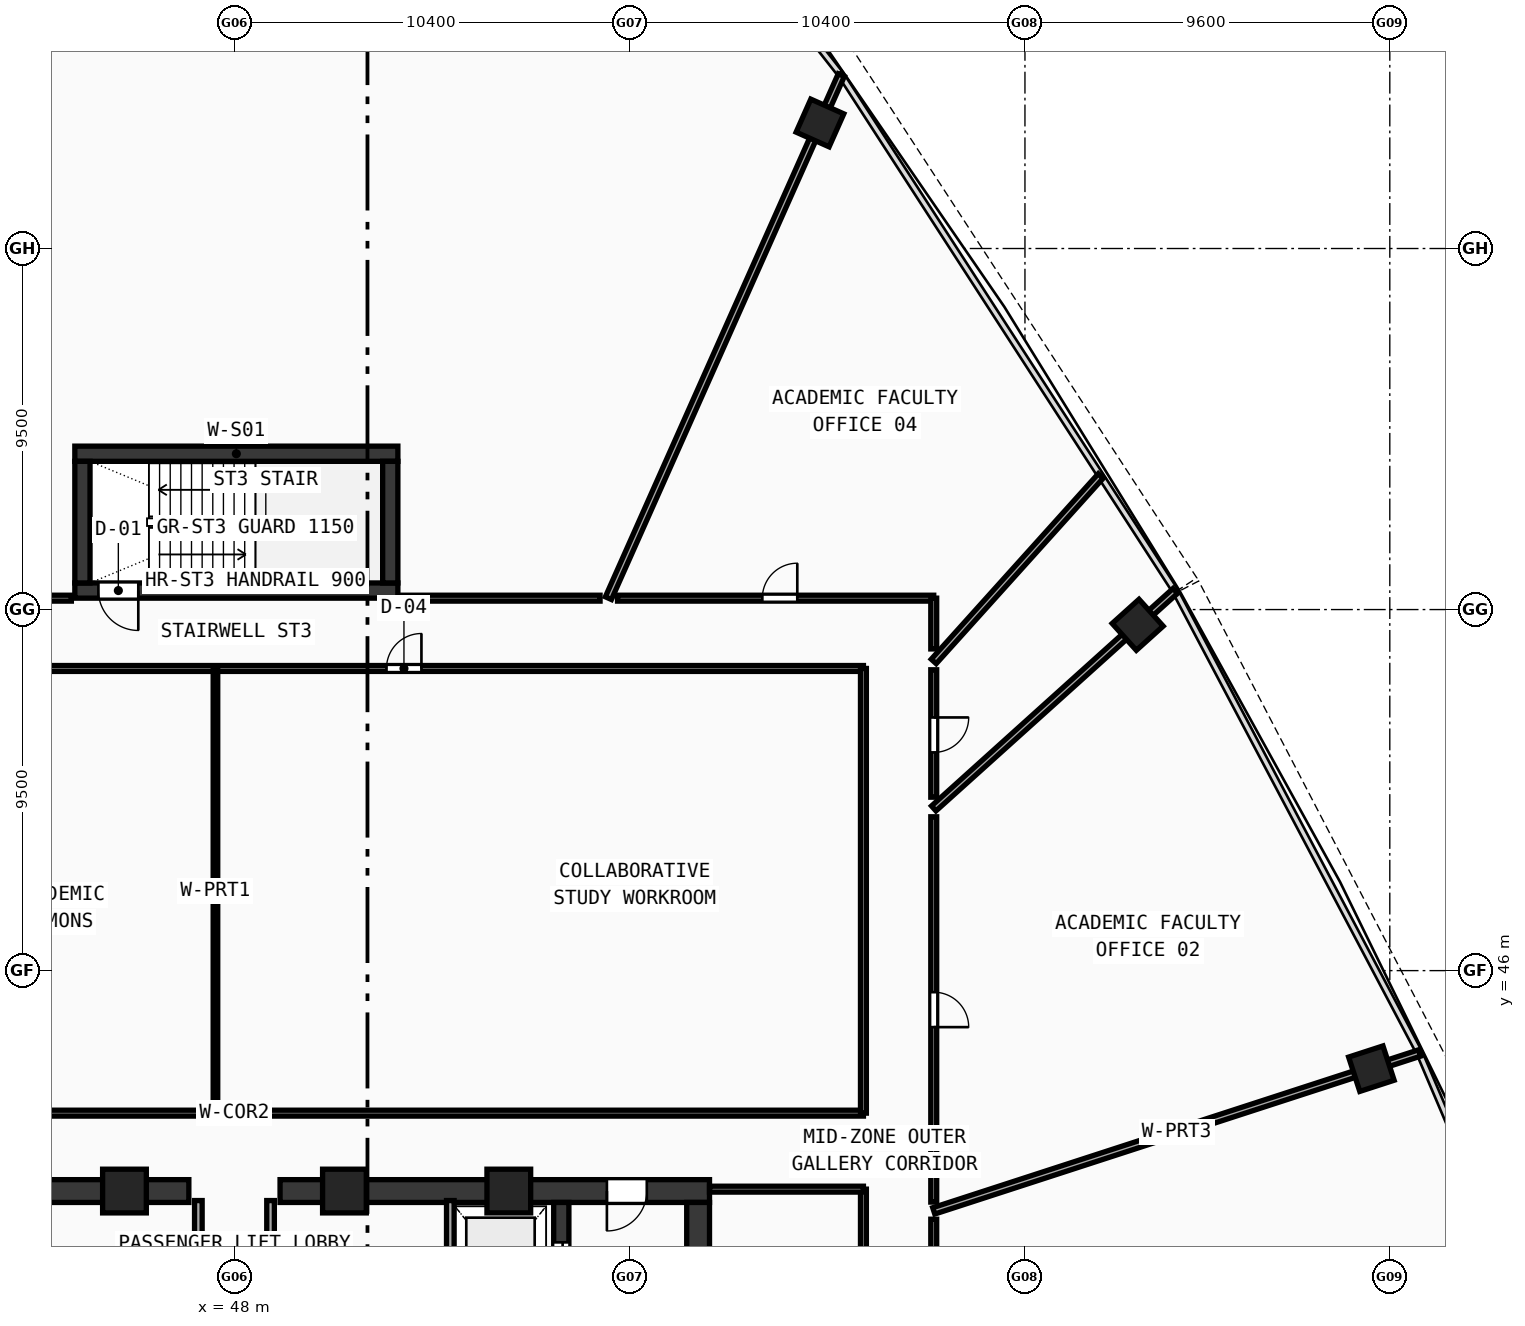
"""IFC4 building model, lengths in metres.
Left out: names, types, materials, properties, quantities, classifications, styles, units other than length and angle.
Written with IfcOpenShell. Run it as: python <this file> out.ifc"""

import sys

from ifc_helpers import new_model, si_unit, direction, frame, frame_2d, origin, origin_with_axes, origin_2d, place, context, subcontext, project, spatial, rectangle, hollow_rectangle, extrude, source, transform, mapped, element, fill, save


model = new_model("IFC4")
c1 = context("Model", 3, precision=1e-05, world=origin(), true_north=direction((0.0, 1.0)))
c2 = subcontext(c1, "Body", "Model", "MODEL_VIEW")
j1 = project(units=[si_unit("LENGTHUNIT", "METRE"), si_unit("PLANEANGLEUNIT", "RADIAN")], contexts=[c1])
p1 = place(None, origin())
s1 = spatial("IfcSite", under=j1, at=p1, CompositionType="ELEMENT")
p2 = place(p1, origin())
s2 = spatial("IfcBuilding", under=s1, at=p2, CompositionType="ELEMENT")
p3 = place(p2, frame((0.0, 0.0, 155.59)))
s3 = spatial("IfcBuildingStorey", under=s2, at=p3, CompositionType="ELEMENT", Elevation=155.59)
p4 = place(p3, frame((35.5, 40.2, 0.0), z_axis=(0.0, 0.0, 1.0), x_axis=(1.0, 0.0, 0.0)))
e1 = element("IfcWall", 1, at=p4, inside=s3, PredefinedType="SHEAR", context=c2, shape_type="SweptSolid", body=[
    extrude(rectangle(XDim=11.3, YDim=0.6, at=frame_2d((5.65, 0.0))), origin(), (0.0, 0.0, 1.0), 3.42),
])
p5 = place(p4, frame((1.65, 0.0, 0.0)))
e2 = element("IfcOpeningElement", 2, at=p5, cuts=e1, PredefinedType="OPENING", context=c2, shape_type="SweptSolid", body=[
    extrude(rectangle(XDim=1.05, YDim=2.1, at=frame_2d((0.525, 1.05))), frame((0.0, 0.31, 0.0), z_axis=(0.0, -1.0, 0.0), x_axis=(1.0, 0.0, 0.0)), (0.0, 0.0, 1.0), 0.62),
])
p6 = place(p3, frame((49.2, 40.2, 0.0), z_axis=(0.0, 0.0, 1.0), x_axis=(1.0, 0.0, 0.0)))
e3 = element("IfcWall", 3, at=p6, inside=s3, PredefinedType="SHEAR", context=c2, shape_type="SweptSolid", body=[
    extrude(rectangle(XDim=11.3, YDim=0.6, at=frame_2d((5.65, 0.0))), origin(), (0.0, 0.0, 1.0), 3.42),
])
p7 = place(p6, frame((8.6, 0.0, 0.0)))
e4 = element("IfcOpeningElement", 4, at=p7, cuts=e3, PredefinedType="OPENING", context=c2, shape_type="SweptSolid", body=[
    extrude(rectangle(XDim=1.05, YDim=2.1, at=frame_2d((0.525, 1.05))), frame((0.0, 0.31, 0.0), z_axis=(0.0, -1.0, 0.0), x_axis=(1.0, 0.0, 0.0)), (0.0, 0.0, 1.0), 0.62),
])
p8 = place(p3, frame((60.2, 27.8, 0.0), z_axis=(0.0, 0.0, 1.0), x_axis=(0.0, 1.0, 0.0)))
e5 = element("IfcWall", 5, at=p8, inside=s3, PredefinedType="SHEAR", context=c2, shape_type="SweptSolid", body=[
    extrude(rectangle(XDim=12.1, YDim=0.6, at=frame_2d((6.05, 0.0))), origin(), (0.0, 0.0, 1.0), 3.42),
])
p9 = place(p3, frame((56.6, 27.8, 0.0), z_axis=(0.0, 0.0, 1.0), x_axis=(0.0, 1.0, 0.0)))
e6 = element("IfcWall", 6, at=p9, inside=s3, PredefinedType="SHEAR", context=c2, shape_type="SweptSolid", body=[
    extrude(rectangle(XDim=12.1, YDim=0.4, at=frame_2d((6.05, 0.0))), origin(), (0.0, 0.0, 1.0), 3.42),
])
p10 = place(p9, frame((9.95, 0.0, 0.0)))
e7 = element("IfcOpeningElement", 7, at=p10, cuts=e6, PredefinedType="OPENING", context=c2, shape_type="SweptSolid", body=[
    extrude(rectangle(XDim=1.1, YDim=2.1, at=frame_2d((0.55, 1.05))), frame((0.0, 0.21, 0.0), z_axis=(0.0, -1.0, 0.0), x_axis=(1.0, 0.0, 0.0)), (0.0, 0.0, 1.0), 0.42),
])
p11 = place(p3, frame((43.8, 59.6, 0.0), z_axis=(0.0, 0.0, 1.0), x_axis=(1.0, 0.0, 0.0)))
e8 = element("IfcWall", 8, at=p11, inside=s3, PredefinedType="SHEAR", context=c2, shape_type="SweptSolid", body=[
    extrude(rectangle(XDim=8.5, YDim=0.4, at=frame_2d((4.25, 0.0))), origin(), (0.0, 0.0, 1.0), 3.42),
])
p12 = place(p3, frame((43.8, 56.0, 0.0), z_axis=(0.0, 0.0, 1.0), x_axis=(1.0, 0.0, 0.0)))
e9 = element("IfcWall", 9, at=p12, inside=s3, PredefinedType="SHEAR", context=c2, shape_type="SweptSolid", body=[
    extrude(rectangle(XDim=8.5, YDim=0.4, at=frame_2d((4.25, 0.0))), origin(), (0.0, 0.0, 1.0), 3.42),
])
p13 = place(p12, frame((0.62, 0.0, 0.0)))
e10 = element("IfcOpeningElement", 10, at=p13, cuts=e9, PredefinedType="OPENING", context=c2, shape_type="SweptSolid", body=[
    extrude(rectangle(XDim=1.05, YDim=2.1, at=frame_2d((0.525, 1.05))), frame((0.0, 0.21, 0.0), z_axis=(0.0, -1.0, 0.0), x_axis=(1.0, 0.0, 0.0)), (0.0, 0.0, 1.0), 0.42),
])
for number, where, z_axis, x_axis in (
    (11, (44.0, 56.2, 0.0), (0.0, 0.0, 1.0), (0.0, 1.0, 0.0)),
    (12, (52.1, 56.2, 0.0), (0.0, 0.0, 1.0), (0.0, 1.0, 0.0)),
):
    element("IfcWall", number, at=place(p3, frame(where, z_axis=z_axis, x_axis=x_axis)), inside=s3, PredefinedType="SHEAR", context=c2, shape_type="SweptSolid", body=[
        extrude(rectangle(XDim=3.2, YDim=0.4, at=frame_2d((1.6, 0.0))), origin(), (0.0, 0.0, 1.0), 3.42),
    ])
m1 = source(origin(), c2, "Body", "SweptSolid", [
    extrude(hollow_rectangle(XDim=1.15, YDim=1.15, WallThickness=0.048, at=origin_2d()), origin(), (0.0, 0.0, 1.0), 3.68),
])
for number, where, z_axis, x_axis in (
    (13, (55.219, 40.2, -0.26), (0.0, 0.0, 1.0), (1.0, 0.0, 0.0)),
    (14, (50.894, 40.2, -0.26), (0.0, 0.0, 1.0), (1.0, 0.0, 0.0)),
    (15, (45.106, 40.2, -0.26), (0.0, 0.0, 1.0), (1.0, 0.0, 0.0)),
):
    element("IfcColumn", number, at=place(p3, frame(where, z_axis=z_axis, x_axis=x_axis)), inside=s3, PredefinedType="COLUMN", context=c2, shape_type="MappedRepresentation", body=[
        mapped(m1, transform((0.0, 0.0, 0.0), scale=1.0)),
    ])
m2 = source(origin(), c2, "Body", "SweptSolid", [
    extrude(hollow_rectangle(XDim=0.95, YDim=0.95, WallThickness=0.04, at=origin_2d()), origin(), (0.0, 0.0, 1.0), 3.68),
])
for number, where, z_axis, x_axis in (
    (16, (77.915, 43.42, -0.26), (0.0, 0.0, 1.0), (-0.309, 0.951, 0.0)),
    (17, (71.766, 55.099, -0.26), (0.0, 0.0, 1.0), (-0.669, 0.743, 0.0)),
    (18, (63.406, 68.303, -0.26), (0.0, 0.0, 1.0), (-0.914, 0.407, 0.0)),
):
    element("IfcColumn", number, at=place(p3, frame(where, z_axis=z_axis, x_axis=x_axis)), inside=s3, PredefinedType="COLUMN", context=c2, shape_type="MappedRepresentation", body=[
        mapped(m2, transform((0.0, 0.0, 0.0), scale=1.0)),
    ])
p14 = place(p3, frame((53.68, 36.65, 0.0), z_axis=(0.0, 0.0, 1.0), x_axis=(0.0, 1.0, 0.0)))
e19 = element("IfcWall", 19, at=p14, inside=s3, PredefinedType="SOLIDWALL", context=c2, shape_type="SweptSolid", body=[
    extrude(rectangle(XDim=3.3, YDim=0.2, at=frame_2d((1.65, 0.0))), origin(), (0.0, 0.0, 1.0), 3.42),
])
for number, where, z_axis, x_axis in (
    (20, (47.05, 35.85, 0.0), (0.0, 0.0, 1.0), (0.0, 1.0, 0.0)),
    (21, (48.95, 35.85, 0.0), (0.0, 0.0, 1.0), (0.0, 1.0, 0.0)),
):
    element("IfcWall", number, at=place(p3, frame(where, z_axis=z_axis, x_axis=x_axis)), inside=s3, PredefinedType="SOLIDWALL", context=c2, shape_type="SweptSolid", body=[
        extrude(rectangle(XDim=4.1, YDim=0.2, at=frame_2d((2.05, 0.0))), origin(), (0.0, 0.0, 1.0), 3.42),
    ])
p15 = place(p3, frame((31.45, 42.25, 0.0), z_axis=(0.0, 0.0, 1.0), x_axis=(1.0, 0.0, 0.0)))
e22 = element("IfcWall", 22, at=p15, inside=s3, PredefinedType="PARTITIONING", context=c2, shape_type="SweptSolid", body=[
    extrude(rectangle(XDim=33.1, YDim=0.155, at=frame_2d((16.55, 0.0))), origin(), (0.0, 0.0, 1.0), 2.77),
])
p16 = place(p3, frame((31.45, 53.95, 0.0), z_axis=(0.0, 0.0, 1.0), x_axis=(1.0, 0.0, 0.0)))
e23 = element("IfcWall", 23, at=p16, inside=s3, PredefinedType="PARTITIONING", context=c2, shape_type="SweptSolid", body=[
    extrude(rectangle(XDim=33.1, YDim=0.155, at=frame_2d((16.55, 0.0))), origin(), (0.0, 0.0, 1.0), 2.77),
])
p17 = place(p16, frame((8.0, 0.0, 0.0)))
e24 = element("IfcOpeningElement", 24, at=p17, cuts=e23, PredefinedType="OPENING", context=c2, shape_type="SweptSolid", body=[
    extrude(rectangle(XDim=0.92, YDim=2.1, at=frame_2d((0.46, 1.05))), frame((0.0, 0.087, 0.0), z_axis=(0.0, -1.0, 0.0), x_axis=(1.0, 0.0, 0.0)), (0.0, 0.0, 1.0), 0.175),
])
p18 = place(p16, frame((20.55, 0.0, 0.0)))
e25 = element("IfcOpeningElement", 25, at=p18, cuts=e23, PredefinedType="OPENING", context=c2, shape_type="SweptSolid", body=[
    extrude(rectangle(XDim=0.92, YDim=2.1, at=frame_2d((0.46, 1.05))), frame((0.0, 0.087, 0.0), z_axis=(0.0, -1.0, 0.0), x_axis=(1.0, 0.0, 0.0)), (0.0, 0.0, 1.0), 0.175),
])
p19 = place(p3, frame((64.55, 42.25, 0.0), z_axis=(0.0, 0.0, 1.0), x_axis=(0.0, 1.0, 0.0)))
e26 = element("IfcWall", 26, at=p19, inside=s3, PredefinedType="PARTITIONING", context=c2, shape_type="SweptSolid", body=[
    extrude(rectangle(XDim=11.7, YDim=0.155, at=frame_2d((5.85, 0.0))), origin(), (0.0, 0.0, 1.0), 2.77),
])
p20 = place(p3, frame((47.5, 42.25, 0.0), z_axis=(0.0, 0.0, 1.0), x_axis=(0.0, 1.0, 0.0)))
e27 = element("IfcWall", 27, at=p20, inside=s3, PredefinedType="PARTITIONING", context=c2, shape_type="SweptSolid", body=[
    extrude(rectangle(XDim=11.7, YDim=0.12, at=frame_2d((5.85, 0.0))), origin(), (0.0, 0.0, 1.0), 3.02),
])
p21 = place(p3, frame((64.55, 23.65, 0.0), z_axis=(0.0, 0.0, 1.0), x_axis=(0.0, 1.0, 0.0)))
e28 = element("IfcWall", 28, at=p21, inside=s3, PredefinedType="PARTITIONING", context=c2, shape_type="SweptSolid", body=[
    extrude(rectangle(XDim=16.6, YDim=0.155, at=frame_2d((8.3, 0.0))), origin(), (0.0, 0.0, 1.0), 2.77),
])
p22 = place(p21, frame((7.5, 0.0, 0.0)))
e29 = element("IfcOpeningElement", 29, at=p22, cuts=e28, PredefinedType="OPENING", context=c2, shape_type="SweptSolid", body=[
    extrude(rectangle(XDim=0.9, YDim=2.08, at=frame_2d((0.45, 1.04))), frame((0.0, 0.087, 0.0), z_axis=(0.0, -1.0, 0.0), x_axis=(1.0, 0.0, 0.0)), (0.0, 0.0, 1.0), 0.175),
])
p23 = place(p3, frame((60.5, 40.25, 0.0), z_axis=(0.0, 0.0, 1.0), x_axis=(1.0, 0.0, 0.0)))
e30 = element("IfcWall", 30, at=p23, inside=s3, PredefinedType="PARTITIONING", context=c2, shape_type="SweptSolid", body=[
    extrude(rectangle(XDim=4.05, YDim=0.155, at=frame_2d((2.025, 0.0))), origin(), (0.0, 0.0, 1.0), 3.42),
])
p24 = place(p3, frame((66.4, 39.678, 0.0), z_axis=(0.0, 0.0, 1.0), x_axis=(0.951059027278, 0.309009266259, 0.0)))
e31 = element("IfcWall", 31, at=p24, inside=s3, PredefinedType="PARTITIONING", context=c2, shape_type="SweptSolid", body=[
    extrude(rectangle(XDim=13.441, YDim=0.175, at=frame_2d((6.72, 0.0))), origin(), (0.0, 0.0, 1.0), 2.77),
])
p25 = place(p3, frame((66.4, 50.267, 0.0), z_axis=(0.0, 0.0, 1.0), x_axis=(0.743147926867, 0.669127161901, 0.0)))
e32 = element("IfcWall", 32, at=p25, inside=s3, PredefinedType="PARTITIONING", context=c2, shape_type="SweptSolid", body=[
    extrude(rectangle(XDim=8.552, YDim=0.175, at=frame_2d((4.276, 0.0))), origin(), (0.0, 0.0, 1.0), 2.77),
])
p26 = place(p3, frame((66.4, 54.135, 0.0), z_axis=(0.0, 0.0, 1.0), x_axis=(0.669139250318, 0.74313704233, 0.0)))
e33 = element("IfcWall", 33, at=p26, inside=s3, PredefinedType="PARTITIONING", context=c2, shape_type="SweptSolid", body=[
    extrude(rectangle(XDim=6.569, YDim=0.175, at=frame_2d((3.284, 0.0))), origin(), (0.0, 0.0, 1.0), 2.77),
])
p27 = place(p3, frame((57.84, 55.8, 0.0), z_axis=(0.0, 0.0, 1.0), x_axis=(0.406736829456, 0.913545374661, 0.0)))
e34 = element("IfcWall", 34, at=p27, inside=s3, PredefinedType="PARTITIONING", context=c2, shape_type="SweptSolid", body=[
    extrude(rectangle(XDim=15.065, YDim=0.175, at=frame_2d((7.532, 0.0))), origin(), (0.0, 0.0, 1.0), 2.77),
])
p28 = place(p3, frame((29.6, 55.8, 0.0), z_axis=(0.0, 0.0, 1.0), x_axis=(1.0, 0.0, 0.0)))
e35 = element("IfcWall", 35, at=p28, inside=s3, PredefinedType="PARTITIONING", context=c2, shape_type="SweptSolid", body=[
    extrude(rectangle(XDim=14.109, YDim=0.155, at=frame_2d((7.054, 0.0))), origin(), (0.0, 0.0, 1.0), 2.77),
])
p29 = place(p28, frame((6.385, 0.0, 0.0)))
e36 = element("IfcOpeningElement", 36, at=p29, cuts=e35, PredefinedType="OPENING", context=c2, shape_type="SweptSolid", body=[
    extrude(rectangle(XDim=0.96, YDim=2.12, at=frame_2d((0.48, 1.06))), frame((0.0, 0.087, 0.0), z_axis=(0.0, -1.0, 0.0), x_axis=(1.0, 0.0, 0.0)), (0.0, 0.0, 1.0), 0.175),
])
p30 = place(p3, frame((52.391, 55.8, 0.0), z_axis=(0.0, 0.0, 1.0), x_axis=(1.0, 0.0, 0.0)))
e37 = element("IfcWall", 37, at=p30, inside=s3, PredefinedType="PARTITIONING", context=c2, shape_type="SweptSolid", body=[
    extrude(rectangle(XDim=5.229, YDim=0.155, at=frame_2d((2.614, 0.0))), origin(), (0.0, 0.0, 1.0), 2.77),
])
p31 = place(p3, frame((58.08, 55.8, 0.0), z_axis=(0.0, 0.0, 1.0), x_axis=(1.0, 0.0, 0.0)))
e38 = element("IfcWall", 38, at=p31, inside=s3, PredefinedType="PARTITIONING", context=c2, shape_type="SweptSolid", body=[
    extrude(rectangle(XDim=8.32, YDim=0.155, at=frame_2d((4.16, 0.0))), origin(), (0.0, 0.0, 1.0), 3.02),
])
p32 = place(p31, frame((3.809, 0.0, 0.0)))
e39 = element("IfcOpeningElement", 39, at=p32, cuts=e38, PredefinedType="OPENING", context=c2, shape_type="SweptSolid", body=[
    extrude(rectangle(XDim=0.92, YDim=2.1, at=frame_2d((0.46, 1.05))), frame((0.0, 0.087, 0.0), z_axis=(0.0, -1.0, 0.0), x_axis=(1.0, 0.0, 0.0)), (0.0, 0.0, 1.0), 0.175),
])
p33 = place(p3, frame((66.4, 55.8, 0.0), z_axis=(0.0, 0.0, 1.0), x_axis=(0.0, -1.0, 0.0)))
e40 = element("IfcWall", 40, at=p33, inside=s3, PredefinedType="PARTITIONING", context=c2, shape_type="SweptSolid", body=[
    extrude(rectangle(XDim=1.336, YDim=0.155, at=frame_2d((0.668, 0.0))), origin(), (0.0, 0.0, 1.0), 3.42),
])
p34 = place(p3, frame((66.4, 53.916, 0.0), z_axis=(0.0, 0.0, 1.0), x_axis=(0.0, -1.0, 0.0)))
e41 = element("IfcWall", 41, at=p34, inside=s3, PredefinedType="PARTITIONING", context=c2, shape_type="SweptSolid", body=[
    extrude(rectangle(XDim=3.352, YDim=0.155, at=frame_2d((1.676, 0.0))), origin(), (0.0, 0.0, 1.0), 3.02),
])
p35 = place(p34, frame((1.254, 0.0, 0.0)))
e42 = element("IfcOpeningElement", 42, at=p35, cuts=e41, PredefinedType="OPENING", context=c2, shape_type="SweptSolid", body=[
    extrude(rectangle(XDim=0.92, YDim=2.1, at=frame_2d((0.46, 1.05))), frame((0.0, 0.087, 0.0), z_axis=(0.0, -1.0, 0.0), x_axis=(1.0, 0.0, 0.0)), (0.0, 0.0, 1.0), 0.175),
])
p36 = place(p3, frame((66.4, 50.048, 0.0), z_axis=(0.0, 0.0, 1.0), x_axis=(0.0, -1.0, 0.0)))
e43 = element("IfcWall", 43, at=p36, inside=s3, PredefinedType="PARTITIONING", context=c2, shape_type="SweptSolid", body=[
    extrude(rectangle(XDim=10.138, YDim=0.155, at=frame_2d((5.069, 0.0))), origin(), (0.0, 0.0, 1.0), 2.77),
])
p37 = place(p36, frame((4.615, 0.0, 0.0)))
e44 = element("IfcOpeningElement", 44, at=p37, cuts=e43, PredefinedType="OPENING", context=c2, shape_type="SweptSolid", body=[
    extrude(rectangle(XDim=0.92, YDim=2.1, at=frame_2d((0.46, 1.05))), frame((0.0, 0.087, 0.0), z_axis=(0.0, -1.0, 0.0), x_axis=(1.0, 0.0, 0.0)), (0.0, 0.0, 1.0), 0.175),
])
p38 = place(p3, frame((66.4, 39.459, 0.0), z_axis=(0.0, 0.0, 1.0), x_axis=(0.0, -1.0, 0.0)))
e45 = element("IfcWall", 45, at=p38, inside=s3, PredefinedType="PARTITIONING", context=c2, shape_type="SweptSolid", body=[
    extrude(rectangle(XDim=8.783, YDim=0.155, at=frame_2d((4.392, 0.0))), origin(), (0.0, 0.0, 1.0), 3.42),
])
p39 = place(p38, frame((3.932, 0.0, 0.0)))
e46 = element("IfcOpeningElement", 46, at=p39, cuts=e45, PredefinedType="OPENING", context=c2, shape_type="SweptSolid", body=[
    extrude(rectangle(XDim=0.92, YDim=2.1, at=frame_2d((0.46, 1.05))), frame((0.0, 0.087, 0.0), z_axis=(0.0, -1.0, 0.0), x_axis=(1.0, 0.0, 0.0)), (0.0, 0.0, 1.0), 0.175),
])
m3 = source(origin(), c2, "Body", "SweptSolid", [
    extrude(rectangle(XDim=1.05, YDim=2.1, at=frame_2d((0.525, 1.05))), frame((0.0, 0.025, 0.0), z_axis=(0.0, -1.0, 0.0), x_axis=(1.0, 0.0, 0.0)), (0.0, 0.0, 1.0), 0.05),
])
p40 = place(p7, frame((1.05, 0.0, 0.0), z_axis=(0.0, 0.0, 1.0), x_axis=(-1.0, 0.0, 0.0)))
e47 = element("IfcDoor", 47, at=p40, inside=s3, OperationType="SINGLE_SWING_RIGHT", PredefinedType="DOOR", context=c2, shape_type="MappedRepresentation", body=[
    mapped(m3, transform((0.0, 0.0, 0.0), scale=1.0)),
])
fill(e4, e47)
m4 = source(origin(), c2, "Body", "SweptSolid", [
    extrude(rectangle(XDim=1.1, YDim=2.1, at=frame_2d((0.55, 1.05))), frame((0.0, 0.025, 0.0), z_axis=(0.0, -1.0, 0.0), x_axis=(1.0, 0.0, 0.0)), (0.0, 0.0, 1.0), 0.05),
])
p41 = place(p10, origin_with_axes())
e48 = element("IfcDoor", 48, at=p41, inside=s3, OperationType="DOUBLE_DOOR_SLIDING", PredefinedType="DOOR", context=c2, shape_type="MappedRepresentation", body=[
    mapped(m4, transform((0.0, 0.0, 0.0), scale=1.0)),
])
fill(e7, e48)
p42 = place(p13, frame((1.05, 0.0, 0.0), z_axis=(0.0, 0.0, 1.0), x_axis=(-1.0, 0.0, 0.0)))
e49 = element("IfcDoor", 49, at=p42, inside=s3, OperationType="SINGLE_SWING_LEFT", PredefinedType="DOOR", context=c2, shape_type="MappedRepresentation", body=[
    mapped(m3, transform((0.0, 0.0, 0.0), scale=1.0)),
])
fill(e10, e49)
m5 = source(origin(), c2, "Body", "SweptSolid", [
    extrude(rectangle(XDim=0.92, YDim=2.1, at=frame_2d((0.46, 1.05))), frame((0.0, 0.025, 0.0), z_axis=(0.0, -1.0, 0.0), x_axis=(1.0, 0.0, 0.0)), (0.0, 0.0, 1.0), 0.05),
])
p43 = place(p18, origin_with_axes())
e50 = element("IfcDoor", 50, at=p43, inside=s3, OperationType="SINGLE_SWING_RIGHT", PredefinedType="DOOR", context=c2, shape_type="MappedRepresentation", body=[
    mapped(m5, transform((0.0, 0.0, 0.0), scale=1.0)),
])
fill(e25, e50)
p44 = place(p37, origin_with_axes())
e51 = element("IfcDoor", 51, at=p44, inside=s3, OperationType="SINGLE_SWING_RIGHT", PredefinedType="DOOR", context=c2, shape_type="MappedRepresentation", body=[
    mapped(m5, transform((0.0, 0.0, 0.0), scale=1.0)),
])
fill(e44, e51)
p45 = place(p35, origin_with_axes())
e52 = element("IfcDoor", 52, at=p45, inside=s3, OperationType="SINGLE_SWING_LEFT", PredefinedType="DOOR", context=c2, shape_type="MappedRepresentation", body=[
    mapped(m5, transform((0.0, 0.0, 0.0), scale=1.0)),
])
fill(e42, e52)
p46 = place(p32, origin_with_axes())
e53 = element("IfcDoor", 53, at=p46, inside=s3, OperationType="SINGLE_SWING_RIGHT", PredefinedType="DOOR", context=c2, shape_type="MappedRepresentation", body=[
    mapped(m5, transform((0.0, 0.0, 0.0), scale=1.0)),
])
fill(e39, e53)
save(model, sys.argv[1])
